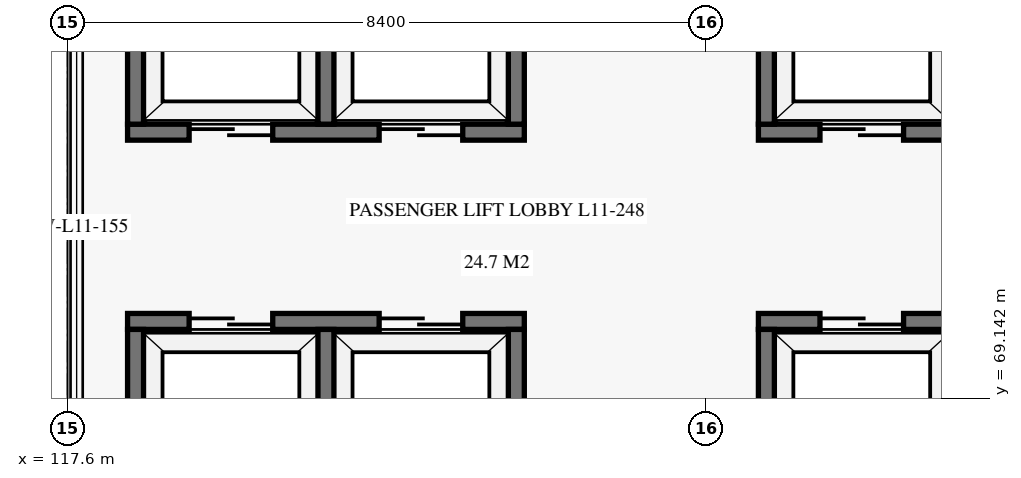
"""IFC4 building model, lengths in metres.
Left out: names, types, materials, properties, quantities, classifications, styles, units other than length and angle.
Written with IfcOpenShell. Run it as: python <this file> out.ifc"""

import sys

from ifc_helpers import new_model, si_unit, direction, frame, frame_2d, origin, place, context, subcontext, project, spatial, rectangle, extrude, element, fill, save


model = new_model("IFC4")
c1 = context("Model", 3, precision=1e-05, world=origin(), true_north=direction((0.0, 1.0)))
c2 = subcontext(c1, "Body", "Model", "MODEL_VIEW")
j1 = project(units=[si_unit("LENGTHUNIT", "METRE"), si_unit("PLANEANGLEUNIT", "RADIAN")], contexts=[c1])
p1 = place(None, origin())
s1 = spatial("IfcSite", under=j1, at=p1, CompositionType="ELEMENT")
p2 = place(p1, origin())
s2 = spatial("IfcBuilding", under=s1, at=p2, CompositionType="ELEMENT")
p3 = place(p2, frame((0.0, 0.0, 46.7)))
s3 = spatial("IfcBuildingStorey", under=s2, at=p3, CompositionType="ELEMENT", Elevation=46.7)
p4 = place(p3, frame((126.69, 70.155, 0.0), z_axis=(0.0, 0.0, 1.0), x_axis=(1.0, 0.0, 0.0)))
e1 = element("IfcWall", 1, at=p4, inside=s3, PredefinedType="SHEAR", context=c2, shape_type="SweptSolid", body=[
    extrude(rectangle(XDim=5.22, YDim=0.21, at=frame_2d((2.61, 0.0))), origin(), (0.0, 0.0, 1.0), 3.72),
])
p5 = place(p4, frame((0.81, 0.0, 0.0)))
e2 = element("IfcOpeningElement", 2, at=p5, cuts=e1, PredefinedType="OPENING", context=c2, shape_type="SweptSolid", body=[
    extrude(rectangle(XDim=1.1, YDim=2.15, at=frame_2d((0.55, 1.075))), frame((0.0, 0.115, 0.0), z_axis=(0.0, -1.0, 0.0), x_axis=(1.0, 0.0, 0.0)), (0.0, 0.0, 1.0), 0.23),
])
p6 = place(p4, frame((3.31, 0.0, 0.0)))
e3 = element("IfcOpeningElement", 3, at=p6, cuts=e1, PredefinedType="OPENING", context=c2, shape_type="SweptSolid", body=[
    extrude(rectangle(XDim=1.1, YDim=2.15, at=frame_2d((0.55, 1.075))), frame((0.0, 0.115, 0.0), z_axis=(0.0, -1.0, 0.0), x_axis=(1.0, 0.0, 0.0)), (0.0, 0.0, 1.0), 0.23),
])
p7 = place(p3, frame((126.795, 67.85, 0.0), z_axis=(0.0, 0.0, 1.0), x_axis=(0.0, 1.0, 0.0)))
e4 = element("IfcWall", 4, at=p7, inside=s3, PredefinedType="SHEAR", context=c2, shape_type="SweptSolid", body=[
    extrude(rectangle(XDim=2.2, YDim=0.21, at=frame_2d((1.1, 0.0))), origin(), (0.0, 0.0, 1.0), 3.72),
])
p8 = place(p3, frame((126.69, 72.645, 0.0), z_axis=(0.0, 0.0, 1.0), x_axis=(1.0, 0.0, 0.0)))
e5 = element("IfcWall", 5, at=p8, inside=s3, PredefinedType="SHEAR", context=c2, shape_type="SweptSolid", body=[
    extrude(rectangle(XDim=5.22, YDim=0.21, at=frame_2d((2.61, 0.0))), origin(), (0.0, 0.0, 1.0), 3.72),
])
p9 = place(p8, frame((0.81, 0.0, 0.0)))
e6 = element("IfcOpeningElement", 6, at=p9, cuts=e5, PredefinedType="OPENING", context=c2, shape_type="SweptSolid", body=[
    extrude(rectangle(XDim=1.1, YDim=2.15, at=frame_2d((0.55, 1.075))), frame((0.0, 0.115, 0.0), z_axis=(0.0, -1.0, 0.0), x_axis=(1.0, 0.0, 0.0)), (0.0, 0.0, 1.0), 0.23),
])
p10 = place(p8, frame((3.31, 0.0, 0.0)))
e7 = element("IfcOpeningElement", 7, at=p10, cuts=e5, PredefinedType="OPENING", context=c2, shape_type="SweptSolid", body=[
    extrude(rectangle(XDim=1.1, YDim=2.15, at=frame_2d((0.55, 1.075))), frame((0.0, 0.115, 0.0), z_axis=(0.0, -1.0, 0.0), x_axis=(1.0, 0.0, 0.0)), (0.0, 0.0, 1.0), 0.23),
])
p11 = place(p3, frame((126.795, 72.75, 0.0), z_axis=(0.0, 0.0, 1.0), x_axis=(0.0, 1.0, 0.0)))
e8 = element("IfcWall", 8, at=p11, inside=s3, PredefinedType="SHEAR", context=c2, shape_type="SweptSolid", body=[
    extrude(rectangle(XDim=2.2, YDim=0.21, at=frame_2d((1.1, 0.0))), origin(), (0.0, 0.0, 1.0), 3.72),
])
p12 = place(p3, frame((118.39, 70.155, 0.0), z_axis=(0.0, 0.0, 1.0), x_axis=(1.0, 0.0, 0.0)))
e9 = element("IfcWall", 9, at=p12, inside=s3, PredefinedType="SHEAR", context=c2, shape_type="SweptSolid", body=[
    extrude(rectangle(XDim=5.22, YDim=0.21, at=frame_2d((2.61, 0.0))), origin(), (0.0, 0.0, 1.0), 3.72),
])
p13 = place(p12, frame((0.81, 0.0, 0.0)))
e10 = element("IfcOpeningElement", 10, at=p13, cuts=e9, PredefinedType="OPENING", context=c2, shape_type="SweptSolid", body=[
    extrude(rectangle(XDim=1.1, YDim=2.15, at=frame_2d((0.55, 1.075))), frame((0.0, 0.115, 0.0), z_axis=(0.0, -1.0, 0.0), x_axis=(1.0, 0.0, 0.0)), (0.0, 0.0, 1.0), 0.23),
])
p14 = place(p12, frame((3.31, 0.0, 0.0)))
e11 = element("IfcOpeningElement", 11, at=p14, cuts=e9, PredefinedType="OPENING", context=c2, shape_type="SweptSolid", body=[
    extrude(rectangle(XDim=1.1, YDim=2.15, at=frame_2d((0.55, 1.075))), frame((0.0, 0.115, 0.0), z_axis=(0.0, -1.0, 0.0), x_axis=(1.0, 0.0, 0.0)), (0.0, 0.0, 1.0), 0.23),
])
for number, where, z_axis, x_axis in (
    (12, (118.495, 67.85, 0.0), (0.0, 0.0, 1.0), (0.0, 1.0, 0.0)),
    (13, (123.505, 67.85, 0.0), (0.0, 0.0, 1.0), (0.0, 1.0, 0.0)),
    (14, (121.0, 67.85, 0.0), (0.0, 0.0, 1.0), (0.0, 1.0, 0.0)),
):
    element("IfcWall", number, at=place(p3, frame(where, z_axis=z_axis, x_axis=x_axis)), inside=s3, PredefinedType="SHEAR", context=c2, shape_type="SweptSolid", body=[
        extrude(rectangle(XDim=2.2, YDim=0.21, at=frame_2d((1.1, 0.0))), origin(), (0.0, 0.0, 1.0), 3.72),
    ])
p15 = place(p3, frame((118.39, 72.645, 0.0), z_axis=(0.0, 0.0, 1.0), x_axis=(1.0, 0.0, 0.0)))
e15 = element("IfcWall", 15, at=p15, inside=s3, PredefinedType="SHEAR", context=c2, shape_type="SweptSolid", body=[
    extrude(rectangle(XDim=5.22, YDim=0.21, at=frame_2d((2.61, 0.0))), origin(), (0.0, 0.0, 1.0), 3.72),
])
p16 = place(p15, frame((0.81, 0.0, 0.0)))
e16 = element("IfcOpeningElement", 16, at=p16, cuts=e15, PredefinedType="OPENING", context=c2, shape_type="SweptSolid", body=[
    extrude(rectangle(XDim=1.1, YDim=2.15, at=frame_2d((0.55, 1.075))), frame((0.0, 0.115, 0.0), z_axis=(0.0, -1.0, 0.0), x_axis=(1.0, 0.0, 0.0)), (0.0, 0.0, 1.0), 0.23),
])
p17 = place(p15, frame((3.31, 0.0, 0.0)))
e17 = element("IfcOpeningElement", 17, at=p17, cuts=e15, PredefinedType="OPENING", context=c2, shape_type="SweptSolid", body=[
    extrude(rectangle(XDim=1.1, YDim=2.15, at=frame_2d((0.55, 1.075))), frame((0.0, 0.115, 0.0), z_axis=(0.0, -1.0, 0.0), x_axis=(1.0, 0.0, 0.0)), (0.0, 0.0, 1.0), 0.23),
])
for number, where, z_axis, x_axis in (
    (18, (118.495, 72.75, 0.0), (0.0, 0.0, 1.0), (0.0, 1.0, 0.0)),
    (19, (123.505, 72.75, 0.0), (0.0, 0.0, 1.0), (0.0, 1.0, 0.0)),
    (20, (121.0, 72.75, 0.0), (0.0, 0.0, 1.0), (0.0, 1.0, 0.0)),
):
    element("IfcWall", number, at=place(p3, frame(where, z_axis=z_axis, x_axis=x_axis)), inside=s3, PredefinedType="SHEAR", context=c2, shape_type="SweptSolid", body=[
        extrude(rectangle(XDim=2.2, YDim=0.21, at=frame_2d((1.1, 0.0))), origin(), (0.0, 0.0, 1.0), 3.72),
    ])
p18 = place(p5, origin())
e21 = element("IfcDoor", 21, at=p18, inside=s3, OperationType="DOUBLE_DOOR_SLIDING", PredefinedType="DOOR", context=c2, shape_type="SweptSolid", body=[
    extrude(rectangle(XDim=1.1, YDim=2.15, at=frame_2d((0.55, 1.075))), frame((0.0, 0.025, 0.0), z_axis=(0.0, -1.0, 0.0), x_axis=(1.0, 0.0, 0.0)), (0.0, 0.0, 1.0), 0.05),
])
fill(e2, e21)
p19 = place(p9, origin())
e22 = element("IfcDoor", 22, at=p19, inside=s3, OperationType="DOUBLE_DOOR_SLIDING", PredefinedType="DOOR", context=c2, shape_type="SweptSolid", body=[
    extrude(rectangle(XDim=1.1, YDim=2.15, at=frame_2d((0.55, 1.075))), frame((0.0, 0.025, 0.0), z_axis=(0.0, -1.0, 0.0), x_axis=(1.0, 0.0, 0.0)), (0.0, 0.0, 1.0), 0.05),
])
fill(e6, e22)
p20 = place(p13, origin())
e23 = element("IfcDoor", 23, at=p20, inside=s3, OperationType="DOUBLE_DOOR_SLIDING", PredefinedType="DOOR", context=c2, shape_type="SweptSolid", body=[
    extrude(rectangle(XDim=1.1, YDim=2.15, at=frame_2d((0.55, 1.075))), frame((0.0, 0.025, 0.0), z_axis=(0.0, -1.0, 0.0), x_axis=(1.0, 0.0, 0.0)), (0.0, 0.0, 1.0), 0.05),
])
fill(e10, e23)
p21 = place(p14, origin())
e24 = element("IfcDoor", 24, at=p21, inside=s3, OperationType="DOUBLE_DOOR_SLIDING", PredefinedType="DOOR", context=c2, shape_type="SweptSolid", body=[
    extrude(rectangle(XDim=1.1, YDim=2.15, at=frame_2d((0.55, 1.075))), frame((0.0, 0.025, 0.0), z_axis=(0.0, -1.0, 0.0), x_axis=(1.0, 0.0, 0.0)), (0.0, 0.0, 1.0), 0.05),
])
fill(e11, e24)
p22 = place(p16, origin())
e25 = element("IfcDoor", 25, at=p22, inside=s3, OperationType="DOUBLE_DOOR_SLIDING", PredefinedType="DOOR", context=c2, shape_type="SweptSolid", body=[
    extrude(rectangle(XDim=1.1, YDim=2.15, at=frame_2d((0.55, 1.075))), frame((0.0, 0.025, 0.0), z_axis=(0.0, -1.0, 0.0), x_axis=(1.0, 0.0, 0.0)), (0.0, 0.0, 1.0), 0.05),
])
fill(e16, e25)
p23 = place(p17, origin())
e26 = element("IfcDoor", 26, at=p23, inside=s3, OperationType="DOUBLE_DOOR_SLIDING", PredefinedType="DOOR", context=c2, shape_type="SweptSolid", body=[
    extrude(rectangle(XDim=1.1, YDim=2.15, at=frame_2d((0.55, 1.075))), frame((0.0, 0.025, 0.0), z_axis=(0.0, -1.0, 0.0), x_axis=(1.0, 0.0, 0.0)), (0.0, 0.0, 1.0), 0.05),
])
fill(e17, e26)
save(model, sys.argv[1])
